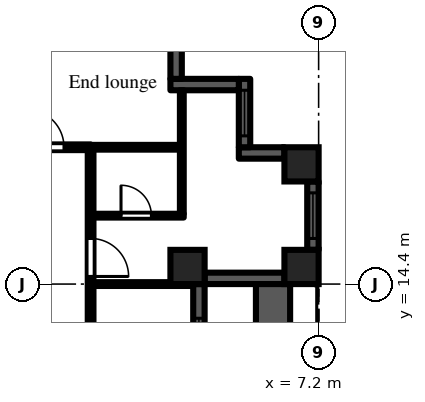
"""IFC4 building model, lengths in metres.
Left out: names, types, materials, properties, quantities, classifications, styles, units other than length and angle.
Written with IfcOpenShell. Run it as: python <this file> out.ifc"""

import sys

from ifc_helpers import new_model, si_unit, direction, frame, frame_2d, origin, origin_2d, place, context, subcontext, project, spatial, rectangle, extrude, element, fill, save


model = new_model("IFC4")
c1 = context("Model", 3, precision=1e-05, world=origin(), true_north=direction((0.0, 1.0)))
c2 = subcontext(c1, "Body", "Model", "MODEL_VIEW")
j1 = project(units=[si_unit("LENGTHUNIT", "METRE"), si_unit("PLANEANGLEUNIT", "RADIAN")], contexts=[c1])
p1 = place(None, origin())
s1 = spatial("IfcSite", under=j1, at=p1, CompositionType="ELEMENT")
p2 = place(p1, origin())
s2 = spatial("IfcBuilding", under=s1, at=p2, CompositionType="ELEMENT")
p3 = place(p2, frame((0.0, 0.0, 69.9)))
s3 = spatial("IfcBuildingStorey", under=s2, at=p3, CompositionType="ELEMENT", Elevation=69.9)
for number, where, z_axis, x_axis in (
    (1, (3.75, 14.85, 0.0), (0.0, 0.0, 1.0), (1.0, 0.0, 0.0)),
    (2, (6.75, 14.85, 0.0), (0.0, 0.0, 1.0), (1.0, 0.0, 0.0)),
    (3, (6.75, 17.55, 0.0), (0.0, 0.0, 1.0), (1.0, 0.0, 0.0)),
):
    element("IfcColumn", number, at=place(p3, frame(where, z_axis=z_axis, x_axis=x_axis)), inside=s3, PredefinedType="COLUMN", context=c2, shape_type="SweptSolid", body=[
        extrude(rectangle(XDim=0.9, YDim=0.9, at=origin_2d()), origin(), (0.0, 0.0, 1.0), 3.0),
    ])
p4 = place(p3, frame((4.05, 7.2, 0.0), z_axis=(0.0, 0.0, 1.0), x_axis=(0.0, 1.0, 0.0)))
e4 = element("IfcWall", 4, at=p4, inside=s3, PredefinedType="SOLIDWALL", context=c2, shape_type="SweptSolid", body=[
    extrude(rectangle(XDim=7.2, YDim=0.3, at=frame_2d((3.6, 0.0))), origin(), (0.0, 0.0, 1.0), 2.1),
])
p5 = place(p4, frame((3.0, 0.0, 0.0)))
e5 = element("IfcOpeningElement", 5, at=p5, cuts=e4, PredefinedType="OPENING", context=c2, shape_type="SweptSolid", body=[
    extrude(rectangle(XDim=1.2, YDim=2.05, at=frame_2d((0.6, 1.025))), frame((0.0, 0.16, 0.0), z_axis=(0.0, -1.0, 0.0), x_axis=(1.0, 0.0, 0.0)), (0.0, 0.0, 1.0), 0.32),
])
p6 = place(p4, frame((0.9, 0.0, 0.2)))
e6 = element("IfcOpeningElement", 6, at=p6, cuts=e4, PredefinedType="OPENING", context=c2, shape_type="SweptSolid", body=[
    extrude(rectangle(XDim=1.8, YDim=1.85, at=frame_2d((0.9, 0.925))), frame((0.0, 0.16, 0.0), z_axis=(0.0, -1.0, 0.0), x_axis=(1.0, 0.0, 0.0)), (0.0, 0.0, 1.0), 0.32),
])
p7 = place(p4, frame((4.5, 0.0, 0.2)))
e7 = element("IfcOpeningElement", 7, at=p7, cuts=e4, PredefinedType="OPENING", context=c2, shape_type="SweptSolid", body=[
    extrude(rectangle(XDim=1.8, YDim=1.85, at=frame_2d((0.9, 0.925))), frame((0.0, 0.16, 0.0), z_axis=(0.0, -1.0, 0.0), x_axis=(1.0, 0.0, 0.0)), (0.0, 0.0, 1.0), 0.32),
])
p8 = place(p3, frame((4.2, 14.55, 0.0), z_axis=(0.0, 0.0, 1.0), x_axis=(1.0, 0.0, 0.0)))
e8 = element("IfcWall", 8, at=p8, inside=s3, PredefinedType="SOLIDWALL", context=c2, shape_type="SweptSolid", body=[
    extrude(rectangle(XDim=2.1, YDim=0.3, at=frame_2d((1.05, 0.0))), origin(), (0.0, 0.0, 1.0), 2.1),
])
p9 = place(p3, frame((7.05, 15.3, 0.0), z_axis=(0.0, 0.0, 1.0), x_axis=(0.0, 1.0, 0.0)))
e9 = element("IfcWall", 9, at=p9, inside=s3, PredefinedType="SOLIDWALL", context=c2, shape_type="SweptSolid", body=[
    extrude(rectangle(XDim=1.8, YDim=0.3, at=frame_2d((0.9, 0.0))), origin(), (0.0, 0.0, 1.0), 2.1),
])
p10 = place(p9, frame((0.3, 0.0, 0.2)))
e10 = element("IfcOpeningElement", 10, at=p10, cuts=e9, PredefinedType="OPENING", context=c2, shape_type="SweptSolid", body=[
    extrude(rectangle(XDim=1.2, YDim=1.85, at=frame_2d((0.6, 0.925))), frame((0.0, 0.16, 0.0), z_axis=(0.0, -1.0, 0.0), x_axis=(1.0, 0.0, 0.0)), (0.0, 0.0, 1.0), 0.32),
])
p11 = place(p3, frame((6.3, 17.85, 0.0), z_axis=(0.0, 0.0, 1.0), x_axis=(-1.0, 0.0, 0.0)))
e11 = element("IfcWall", 11, at=p11, inside=s3, PredefinedType="SOLIDWALL", context=c2, shape_type="SweptSolid", body=[
    extrude(rectangle(XDim=1.2, YDim=0.3, at=frame_2d((0.6, 0.0))), origin(), (0.0, 0.0, 1.0), 2.575),
])
p12 = place(p3, frame((5.25, 18.0, 0.0), z_axis=(0.0, 0.0, 1.0), x_axis=(0.0, 1.0, 0.0)))
e12 = element("IfcWall", 12, at=p12, inside=s3, PredefinedType="SOLIDWALL", context=c2, shape_type="SweptSolid", body=[
    extrude(rectangle(XDim=1.8, YDim=0.3, at=frame_2d((0.9, 0.0))), origin(), (0.0, 0.0, 1.0), 2.575),
])
p13 = place(p12, frame((0.3, 0.0, 0.2)))
e13 = element("IfcOpeningElement", 13, at=p13, cuts=e12, PredefinedType="OPENING", context=c2, shape_type="SweptSolid", body=[
    extrude(rectangle(XDim=1.2, YDim=1.85, at=frame_2d((0.6, 0.925))), frame((0.0, 0.16, 0.0), z_axis=(0.0, -1.0, 0.0), x_axis=(1.0, 0.0, 0.0)), (0.0, 0.0, 1.0), 0.32),
])
p14 = place(p3, frame((5.1, 19.65, 0.0), z_axis=(0.0, 0.0, 1.0), x_axis=(-1.0, 0.0, 0.0)))
e14 = element("IfcWall", 14, at=p14, inside=s3, PredefinedType="SOLIDWALL", context=c2, shape_type="SweptSolid", body=[
    extrude(rectangle(XDim=1.8, YDim=0.3, at=frame_2d((0.9, 0.0))), origin(), (0.0, 0.0, 1.0), 2.575),
])
p15 = place(p3, frame((3.45, 19.8, 0.0), z_axis=(0.0, 0.0, 1.0), x_axis=(0.0, 1.0, 0.0)))
e15 = element("IfcWall", 15, at=p15, inside=s3, PredefinedType="SOLIDWALL", context=c2, shape_type="SweptSolid", body=[
    extrude(rectangle(XDim=0.9, YDim=0.3, at=frame_2d((0.45, 0.0))), origin(), (0.0, 0.0, 1.0), 2.575),
])
p16 = place(p3, frame((6.0, 7.2, 0.0), z_axis=(0.0, 0.0, 1.0), x_axis=(0.0, 1.0, 0.0)))
e16 = element("IfcWall", 16, at=p16, inside=s3, PredefinedType="PARAPET", context=c2, shape_type="SweptSolid", body=[
    extrude(rectangle(XDim=7.2, YDim=0.9, at=frame_2d((3.6, 0.0))), origin(), (0.0, 0.0, 1.0), 0.8),
])
p17 = place(p3, frame((-1.2, 18.0, 0.0), z_axis=(0.0, 0.0, 1.0), x_axis=(1.0, 0.0, 0.0)))
e17 = element("IfcWall", 17, at=p17, inside=s3, PredefinedType="PARTITIONING", context=c2, shape_type="SweptSolid", body=[
    extrude(rectangle(XDim=2.4, YDim=0.15, at=frame_2d((1.2, 0.0))), origin(), (0.0, 0.0, 1.0), 2.575),
])
p18 = place(p17, frame((0.7, 0.0, 0.0)))
e18 = element("IfcOpeningElement", 18, at=p18, cuts=e17, PredefinedType="OPENING", context=c2, shape_type="SweptSolid", body=[
    extrude(rectangle(XDim=1.0, YDim=2.1, at=frame_2d((0.5, 1.05))), frame((0.0, 0.085, 0.0), z_axis=(0.0, -1.0, 0.0), x_axis=(1.0, 0.0, 0.0)), (0.0, 0.0, 1.0), 0.17),
])
p19 = place(p3, frame((1.2, 1.125, 0.0), z_axis=(0.0, 0.0, 1.0), x_axis=(0.0, 1.0, 0.0)))
e19 = element("IfcWall", 19, at=p19, inside=s3, PredefinedType="PARTITIONING", context=c2, shape_type="SweptSolid", body=[
    extrude(rectangle(XDim=16.8, YDim=0.15, at=frame_2d((8.4, 0.0))), origin(), (0.0, 0.0, 1.0), 2.575),
])
p20 = place(p19, frame((7.025, 0.0, 0.0)))
e20 = element("IfcOpeningElement", 20, at=p20, cuts=e19, PredefinedType="OPENING", context=c2, shape_type="SweptSolid", body=[
    extrude(rectangle(XDim=0.9, YDim=2.1, at=frame_2d((0.45, 1.05))), frame((0.0, 0.085, 0.0), z_axis=(0.0, -1.0, 0.0), x_axis=(1.0, 0.0, 0.0)), (0.0, 0.0, 1.0), 0.17),
])
p21 = place(p19, frame((10.625, 0.0, 0.0)))
e21 = element("IfcOpeningElement", 21, at=p21, cuts=e19, PredefinedType="OPENING", context=c2, shape_type="SweptSolid", body=[
    extrude(rectangle(XDim=0.9, YDim=2.1, at=frame_2d((0.45, 1.05))), frame((0.0, 0.085, 0.0), z_axis=(0.0, -1.0, 0.0), x_axis=(1.0, 0.0, 0.0)), (0.0, 0.0, 1.0), 0.17),
])
p22 = place(p19, frame((13.475, 0.0, 0.0)))
e22 = element("IfcOpeningElement", 22, at=p22, cuts=e19, PredefinedType="OPENING", context=c2, shape_type="SweptSolid", body=[
    extrude(rectangle(XDim=1.0, YDim=2.1, at=frame_2d((0.5, 1.05))), frame((0.0, 0.085, 0.0), z_axis=(0.0, -1.0, 0.0), x_axis=(1.0, 0.0, 0.0)), (0.0, 0.0, 1.0), 0.17),
])
p23 = place(p3, frame((1.275, 14.4, 0.0), z_axis=(0.0, 0.0, 1.0), x_axis=(1.0, 0.0, 0.0)))
e23 = element("IfcWall", 23, at=p23, inside=s3, PredefinedType="PARTITIONING", context=c2, shape_type="SweptSolid", body=[
    extrude(rectangle(XDim=2.625, YDim=0.1, at=frame_2d((1.312, 0.0))), origin(), (0.0, 0.0, 1.0), 2.575),
])
p24 = place(p3, frame((1.275, 16.2, 0.0), z_axis=(0.0, 0.0, 1.0), x_axis=(1.0, 0.0, 0.0)))
e24 = element("IfcWall", 24, at=p24, inside=s3, PredefinedType="PARTITIONING", context=c2, shape_type="SweptSolid", body=[
    extrude(rectangle(XDim=2.375, YDim=0.1, at=frame_2d((1.188, 0.0))), origin(), (0.0, 0.0, 1.0), 2.575),
])
p25 = place(p24, frame((0.725, 0.0, 0.0)))
e25 = element("IfcOpeningElement", 25, at=p25, cuts=e24, PredefinedType="OPENING", context=c2, shape_type="SweptSolid", body=[
    extrude(rectangle(XDim=0.8, YDim=2.1, at=frame_2d((0.4, 1.05))), frame((0.0, 0.06, 0.0), z_axis=(0.0, -1.0, 0.0), x_axis=(1.0, 0.0, 0.0)), (0.0, 0.0, 1.0), 0.12),
])
p26 = place(p3, frame((1.2, 18.0, 0.0), z_axis=(0.0, 0.0, 1.0), x_axis=(1.0, 0.0, 0.0)))
e26 = element("IfcWall", 26, at=p26, inside=s3, PredefinedType="PARTITIONING", context=c2, shape_type="SweptSolid", body=[
    extrude(rectangle(XDim=2.35, YDim=0.125, at=frame_2d((1.175, 0.0))), origin(), (0.0, 0.0, 1.0), 2.575),
])
p27 = place(p3, frame((3.6, 16.25, 0.0), z_axis=(0.0, 0.0, 1.0), x_axis=(0.0, 1.0, 0.0)))
e27 = element("IfcWall", 27, at=p27, inside=s3, PredefinedType="PARTITIONING", context=c2, shape_type="SweptSolid", body=[
    extrude(rectangle(XDim=3.25, YDim=0.1, at=frame_2d((1.625, 0.0))), origin(), (0.0, 0.0, 1.0), 2.575),
])
p28 = place(p7, origin())
e28 = element("IfcWindow", 28, at=p28, inside=s3, PartitioningType="SINGLE_PANEL", PredefinedType="WINDOW", context=c2, shape_type="SweptSolid", body=[
    extrude(rectangle(XDim=1.8, YDim=1.85, at=frame_2d((0.9, 0.925))), frame((0.0, 0.03, 0.0), z_axis=(0.0, -1.0, 0.0), x_axis=(1.0, 0.0, 0.0)), (0.0, 0.0, 1.0), 0.06),
])
fill(e7, e28)
p29 = place(p10, origin())
e29 = element("IfcWindow", 29, at=p29, inside=s3, PartitioningType="SINGLE_PANEL", PredefinedType="WINDOW", context=c2, shape_type="SweptSolid", body=[
    extrude(rectangle(XDim=1.2, YDim=1.85, at=frame_2d((0.6, 0.925))), frame((0.0, 0.03, 0.0), z_axis=(0.0, -1.0, 0.0), x_axis=(1.0, 0.0, 0.0)), (0.0, 0.0, 1.0), 0.06),
])
fill(e10, e29)
p30 = place(p13, origin())
e30 = element("IfcWindow", 30, at=p30, inside=s3, PartitioningType="SINGLE_PANEL", PredefinedType="WINDOW", context=c2, shape_type="SweptSolid", body=[
    extrude(rectangle(XDim=1.2, YDim=1.85, at=frame_2d((0.6, 0.925))), frame((0.0, 0.03, 0.0), z_axis=(0.0, -1.0, 0.0), x_axis=(1.0, 0.0, 0.0)), (0.0, 0.0, 1.0), 0.06),
])
fill(e13, e30)
p31 = place(p18, origin())
e31 = element("IfcDoor", 31, at=p31, inside=s3, OperationType="SINGLE_SWING_LEFT", PredefinedType="DOOR", context=c2, shape_type="SweptSolid", body=[
    extrude(rectangle(XDim=1.0, YDim=2.1, at=frame_2d((0.5, 1.05))), frame((0.0, 0.025, 0.0), z_axis=(0.0, -1.0, 0.0), x_axis=(1.0, 0.0, 0.0)), (0.0, 0.0, 1.0), 0.05),
])
fill(e18, e31)
p32 = place(p25, origin())
e32 = element("IfcDoor", 32, at=p32, inside=s3, OperationType="SINGLE_SWING_LEFT", PredefinedType="DOOR", context=c2, shape_type="SweptSolid", body=[
    extrude(rectangle(XDim=0.8, YDim=2.1, at=frame_2d((0.4, 1.05))), frame((0.0, 0.025, 0.0), z_axis=(0.0, -1.0, 0.0), x_axis=(1.0, 0.0, 0.0)), (0.0, 0.0, 1.0), 0.05),
])
fill(e25, e32)
p33 = place(p22, frame((1.0, 0.0, 0.0), z_axis=(0.0, 0.0, 1.0), x_axis=(-1.0, 0.0, 0.0)))
e33 = element("IfcDoor", 33, at=p33, inside=s3, OperationType="SINGLE_SWING_RIGHT", PredefinedType="DOOR", context=c2, shape_type="SweptSolid", body=[
    extrude(rectangle(XDim=1.0, YDim=2.1, at=frame_2d((0.5, 1.05))), frame((0.0, 0.025, 0.0), z_axis=(0.0, -1.0, 0.0), x_axis=(1.0, 0.0, 0.0)), (0.0, 0.0, 1.0), 0.05),
])
fill(e22, e33)
save(model, sys.argv[1])
